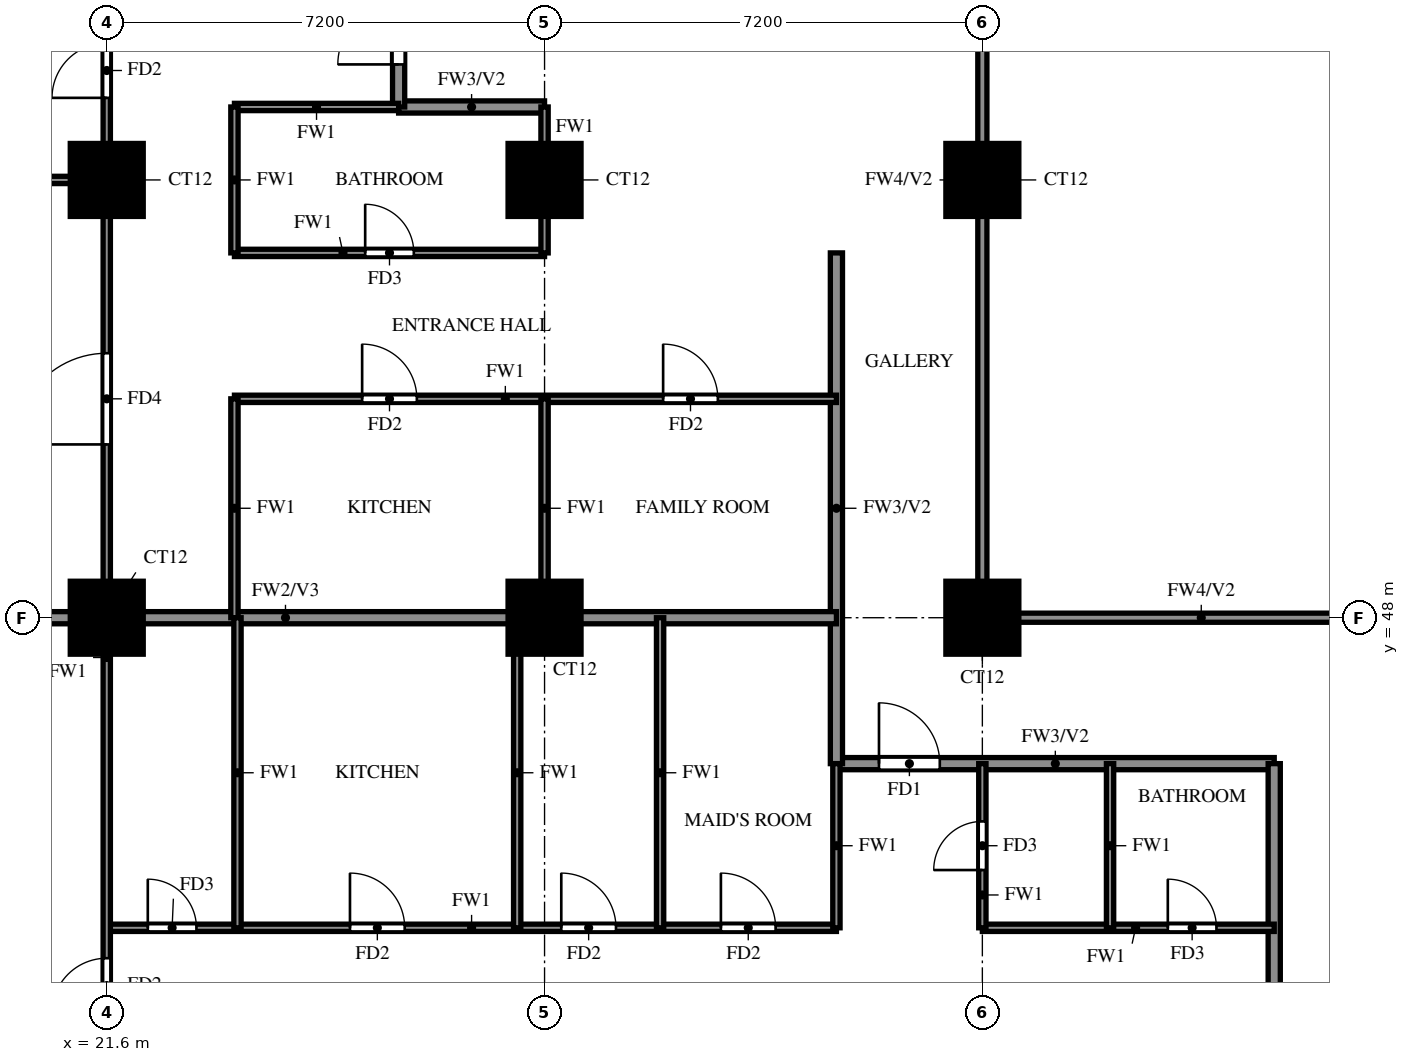
"""IFC4 building model, lengths in metres.
Left out: names, types, materials, properties, quantities, classifications, styles, units other than length and angle.
Written with IfcOpenShell. Run it as: python <this file> out.ifc"""

import sys

from ifc_helpers import new_model, si_unit, direction, frame, frame_2d, origin, origin_2d, place, context, subcontext, project, spatial, rectangle, extrude, source, transform, mapped, element, fill, save


model = new_model("IFC4")
c1 = context("Model", 3, precision=1e-05, world=origin(), true_north=direction((0.0, 1.0)))
c2 = subcontext(c1, "Body", "Model", "MODEL_VIEW")
j1 = project(units=[si_unit("LENGTHUNIT", "METRE"), si_unit("PLANEANGLEUNIT", "RADIAN")], contexts=[c1])
p1 = place(None, origin())
s1 = spatial("IfcSite", under=j1, at=p1, CompositionType="ELEMENT")
p2 = place(p1, origin())
s2 = spatial("IfcBuilding", under=s1, at=p2, CompositionType="ELEMENT")
p3 = place(p2, frame((0.0, 0.0, 93.5)))
s3 = spatial("IfcBuildingStorey", under=s2, at=p3, CompositionType="ELEMENT", Elevation=93.5)
m1 = source(origin(), c2, "Body", "SweptSolid", [
    extrude(rectangle(XDim=1.2, YDim=1.2, at=origin_2d()), origin(), (0.0, 0.0, 1.0), 3.18),
])
for number, where, z_axis, x_axis in (
    (1, (21.6, 48.0, 0.0), (0.0, 0.0, 1.0), (1.0, 0.0, 0.0)),
    (2, (28.8, 48.0, 0.0), (0.0, 0.0, 1.0), (1.0, 0.0, 0.0)),
    (3, (36.0, 48.0, 0.0), (0.0, 0.0, 1.0), (1.0, 0.0, 0.0)),
    (4, (21.6, 55.2, 0.0), (0.0, 0.0, 1.0), (1.0, 0.0, 0.0)),
    (5, (28.8, 55.2, 0.0), (0.0, 0.0, 1.0), (1.0, 0.0, 0.0)),
    (6, (36.0, 55.2, 0.0), (0.0, 0.0, 1.0), (1.0, 0.0, 0.0)),
):
    element("IfcColumn", number, at=place(p3, frame(where, z_axis=z_axis, x_axis=x_axis)), inside=s3, PredefinedType="COLUMN", context=c2, shape_type="MappedRepresentation", body=[
        mapped(m1, transform((0.0, 0.0, 0.0))),
    ])
p4 = place(p3, frame((33.6, 45.6, 0.0), z_axis=(0.0, 0.0, 1.0), x_axis=(1.0, 0.0, 0.0)))
e7 = element("IfcWall", 7, at=p4, inside=s3, PredefinedType="SOLIDWALL", context=c2, shape_type="SweptSolid", body=[
    extrude(rectangle(XDim=7.2, YDim=0.2, at=frame_2d((3.6, 0.0))), origin(), (0.0, 0.0, 1.0), 3.18),
])
p5 = place(p4, frame((0.7, 0.0, 0.0)))
e8 = element("IfcOpeningElement", 8, at=p5, cuts=e7, PredefinedType="OPENING", context=c2, shape_type="SweptSolid", body=[
    extrude(rectangle(XDim=1.0, YDim=2.1, at=frame_2d((0.5, 1.05))), frame((0.0, 0.11, 0.0), z_axis=(0.0, -1.0, 0.0), x_axis=(1.0, 0.0, 0.0)), (0.0, 0.0, 1.0), 0.22),
])
p6 = place(p3, frame((26.4, 56.4, 0.0), z_axis=(0.0, 0.0, 1.0), x_axis=(1.0, 0.0, 0.0)))
e9 = element("IfcWall", 9, at=p6, inside=s3, PredefinedType="SOLIDWALL", context=c2, shape_type="SweptSolid", body=[
    extrude(rectangle(XDim=2.4, YDim=0.2, at=frame_2d((1.2, 0.0))), origin(), (0.0, 0.0, 1.0), 3.18),
])
p7 = place(p3, frame((26.4, 56.4, 0.0), z_axis=(0.0, 0.0, 1.0), x_axis=(0.0, 1.0, 0.0)))
e10 = element("IfcWall", 10, at=p7, inside=s3, PredefinedType="SOLIDWALL", context=c2, shape_type="SweptSolid", body=[
    extrude(rectangle(XDim=9.6, YDim=0.2, at=frame_2d((4.8, 0.0))), origin(), (0.0, 0.0, 1.0), 3.18),
])
p8 = place(p7, frame((0.7, 0.0, 0.0)))
e11 = element("IfcOpeningElement", 11, at=p8, cuts=e10, PredefinedType="OPENING", context=c2, shape_type="SweptSolid", body=[
    extrude(rectangle(XDim=1.0, YDim=2.1, at=frame_2d((0.5, 1.05))), frame((0.0, 0.11, 0.0), z_axis=(0.0, -1.0, 0.0), x_axis=(1.0, 0.0, 0.0)), (0.0, 0.0, 1.0), 0.22),
])
p9 = place(p7, frame((3.1, 0.0, 0.0)))
e12 = element("IfcOpeningElement", 12, at=p9, cuts=e10, PredefinedType="OPENING", context=c2, shape_type="SweptSolid", body=[
    extrude(rectangle(XDim=1.0, YDim=2.1, at=frame_2d((0.5, 1.05))), frame((0.0, 0.11, 0.0), z_axis=(0.0, -1.0, 0.0), x_axis=(1.0, 0.0, 0.0)), (0.0, 0.0, 1.0), 0.22),
])
p10 = place(p3, frame((33.6, 45.6, 0.0), z_axis=(0.0, 0.0, 1.0), x_axis=(0.0, 1.0, 0.0)))
e13 = element("IfcWall", 13, at=p10, inside=s3, PredefinedType="SOLIDWALL", context=c2, shape_type="SweptSolid", body=[
    extrude(rectangle(XDim=8.4, YDim=0.2, at=frame_2d((4.2, 0.0))), origin(), (0.0, 0.0, 1.0), 3.18),
])
p11 = place(p3, frame((40.8, 33.725, 0.0), z_axis=(0.0, 0.0, 1.0), x_axis=(0.0, 1.0, 0.0)))
e14 = element("IfcWall", 14, at=p11, inside=s3, PredefinedType="SOLIDWALL", context=c2, shape_type="SweptSolid", body=[
    extrude(rectangle(XDim=11.875, YDim=0.2, at=frame_2d((5.938, 0.0))), origin(), (0.0, 0.0, 1.0), 2.28),
])
p12 = place(p3, frame((14.525, 48.0, 0.0), z_axis=(0.0, 0.0, 1.0), x_axis=(1.0, 0.0, 0.0)))
e15 = element("IfcWall", 15, at=p12, inside=s3, PredefinedType="SOLIDWALL", context=c2, shape_type="SweptSolid", body=[
    extrude(rectangle(XDim=19.075, YDim=0.2, at=frame_2d((9.538, 0.0))), origin(), (0.0, 0.0, 1.0), 3.18),
])
p13 = place(p3, frame((21.6, 42.9, 0.0), z_axis=(0.0, 0.0, 1.0), x_axis=(1.0, 0.0, 0.0)))
e16 = element("IfcWall", 16, at=p13, inside=s3, PredefinedType="PARTITIONING", context=c2, shape_type="SweptSolid", body=[
    extrude(rectangle(XDim=12.0, YDim=0.12, at=frame_2d((6.0, 0.0))), origin(), (0.0, 0.0, 1.0), 3.18),
])
p14 = place(p13, frame((0.675, 0.0, 0.0)))
e17 = element("IfcOpeningElement", 17, at=p14, cuts=e16, PredefinedType="OPENING", context=c2, shape_type="SweptSolid", body=[
    extrude(rectangle(XDim=0.8, YDim=2.1, at=frame_2d((0.4, 1.05))), frame((0.0, 0.07, 0.0), z_axis=(0.0, -1.0, 0.0), x_axis=(1.0, 0.0, 0.0)), (0.0, 0.0, 1.0), 0.14),
])
p15 = place(p13, frame((4.0, 0.0, 0.0)))
e18 = element("IfcOpeningElement", 18, at=p15, cuts=e16, PredefinedType="OPENING", context=c2, shape_type="SweptSolid", body=[
    extrude(rectangle(XDim=0.9, YDim=2.1, at=frame_2d((0.45, 1.05))), frame((0.0, 0.07, 0.0), z_axis=(0.0, -1.0, 0.0), x_axis=(1.0, 0.0, 0.0)), (0.0, 0.0, 1.0), 0.14),
])
p16 = place(p13, frame((7.475, 0.0, 0.0)))
e19 = element("IfcOpeningElement", 19, at=p16, cuts=e16, PredefinedType="OPENING", context=c2, shape_type="SweptSolid", body=[
    extrude(rectangle(XDim=0.9, YDim=2.1, at=frame_2d((0.45, 1.05))), frame((0.0, 0.07, 0.0), z_axis=(0.0, -1.0, 0.0), x_axis=(1.0, 0.0, 0.0)), (0.0, 0.0, 1.0), 0.14),
])
p17 = place(p13, frame((10.1, 0.0, 0.0)))
e20 = element("IfcOpeningElement", 20, at=p17, cuts=e16, PredefinedType="OPENING", context=c2, shape_type="SweptSolid", body=[
    extrude(rectangle(XDim=0.9, YDim=2.1, at=frame_2d((0.45, 1.05))), frame((0.0, 0.07, 0.0), z_axis=(0.0, -1.0, 0.0), x_axis=(1.0, 0.0, 0.0)), (0.0, 0.0, 1.0), 0.14),
])
p18 = place(p3, frame((36.0, 42.9, 0.0), z_axis=(0.0, 0.0, 1.0), x_axis=(1.0, 0.0, 0.0)))
e21 = element("IfcWall", 21, at=p18, inside=s3, PredefinedType="PARTITIONING", context=c2, shape_type="SweptSolid", body=[
    extrude(rectangle(XDim=4.8, YDim=0.12, at=frame_2d((2.4, 0.0))), origin(), (0.0, 0.0, 1.0), 3.18),
])
p19 = place(p18, frame((3.05, 0.0, 0.0)))
e22 = element("IfcOpeningElement", 22, at=p19, cuts=e21, PredefinedType="OPENING", context=c2, shape_type="SweptSolid", body=[
    extrude(rectangle(XDim=0.8, YDim=2.1, at=frame_2d((0.4, 1.05))), frame((0.0, 0.07, 0.0), z_axis=(0.0, -1.0, 0.0), x_axis=(1.0, 0.0, 0.0)), (0.0, 0.0, 1.0), 0.14),
])
p20 = place(p3, frame((23.7, 51.6, 0.0), z_axis=(0.0, 0.0, 1.0), x_axis=(1.0, 0.0, 0.0)))
e23 = element("IfcWall", 23, at=p20, inside=s3, PredefinedType="PARTITIONING", context=c2, shape_type="SweptSolid", body=[
    extrude(rectangle(XDim=9.9, YDim=0.12, at=frame_2d((4.95, 0.0))), origin(), (0.0, 0.0, 1.0), 3.18),
])
p21 = place(p20, frame((2.1, 0.0, 0.0)))
e24 = element("IfcOpeningElement", 24, at=p21, cuts=e23, PredefinedType="OPENING", context=c2, shape_type="SweptSolid", body=[
    extrude(rectangle(XDim=0.9, YDim=2.1, at=frame_2d((0.45, 1.05))), frame((0.0, 0.07, 0.0), z_axis=(0.0, -1.0, 0.0), x_axis=(1.0, 0.0, 0.0)), (0.0, 0.0, 1.0), 0.14),
])
p22 = place(p20, frame((7.05, 0.0, 0.0)))
e25 = element("IfcOpeningElement", 25, at=p22, cuts=e23, PredefinedType="OPENING", context=c2, shape_type="SweptSolid", body=[
    extrude(rectangle(XDim=0.9, YDim=2.1, at=frame_2d((0.45, 1.05))), frame((0.0, 0.07, 0.0), z_axis=(0.0, -1.0, 0.0), x_axis=(1.0, 0.0, 0.0)), (0.0, 0.0, 1.0), 0.14),
])
p23 = place(p3, frame((23.7, 54.0, 0.0), z_axis=(0.0, 0.0, 1.0), x_axis=(1.0, 0.0, 0.0)))
e26 = element("IfcWall", 26, at=p23, inside=s3, PredefinedType="PARTITIONING", context=c2, shape_type="SweptSolid", body=[
    extrude(rectangle(XDim=5.1, YDim=0.12, at=frame_2d((2.55, 0.0))), origin(), (0.0, 0.0, 1.0), 3.18),
])
p24 = place(p23, frame((2.15, 0.0, 0.0)))
e27 = element("IfcOpeningElement", 27, at=p24, cuts=e26, PredefinedType="OPENING", context=c2, shape_type="SweptSolid", body=[
    extrude(rectangle(XDim=0.8, YDim=2.1, at=frame_2d((0.4, 1.05))), frame((0.0, 0.07, 0.0), z_axis=(0.0, -1.0, 0.0), x_axis=(1.0, 0.0, 0.0)), (0.0, 0.0, 1.0), 0.14),
])
p25 = place(p3, frame((14.525, 55.2, 0.0), z_axis=(0.0, 0.0, 1.0), x_axis=(1.0, 0.0, 0.0)))
e28 = element("IfcWall", 28, at=p25, inside=s3, PredefinedType="PARTITIONING", context=c2, shape_type="SweptSolid", body=[
    extrude(rectangle(XDim=7.075, YDim=0.12, at=frame_2d((3.538, 0.0))), origin(), (0.0, 0.0, 1.0), 3.18),
])
p26 = place(p3, frame((23.7, 56.4, 0.0), z_axis=(0.0, 0.0, 1.0), x_axis=(1.0, 0.0, 0.0)))
e29 = element("IfcWall", 29, at=p26, inside=s3, PredefinedType="PARTITIONING", context=c2, shape_type="SweptSolid", body=[
    extrude(rectangle(XDim=2.7, YDim=0.12, at=frame_2d((1.35, 0.0))), origin(), (0.0, 0.0, 1.0), 3.18),
])
p27 = place(p3, frame((21.6, 33.725, 0.0), z_axis=(0.0, 0.0, 1.0), x_axis=(0.0, 1.0, 0.0)))
e30 = element("IfcWall", 30, at=p27, inside=s3, PredefinedType="PARTITIONING", context=c2, shape_type="SweptSolid", body=[
    extrude(rectangle(XDim=28.675, YDim=0.12, at=frame_2d((14.337, 0.0))), origin(), (0.0, 0.0, 1.0), 3.18),
])
p28 = place(p27, frame((7.775, 0.0, 0.0)))
e31 = element("IfcOpeningElement", 31, at=p28, cuts=e30, PredefinedType="OPENING", context=c2, shape_type="SweptSolid", body=[
    extrude(rectangle(XDim=0.9, YDim=2.1, at=frame_2d((0.45, 1.05))), frame((0.0, 0.07, 0.0), z_axis=(0.0, -1.0, 0.0), x_axis=(1.0, 0.0, 0.0)), (0.0, 0.0, 1.0), 0.14),
])
p29 = place(p27, frame((17.125, 0.0, 0.0)))
e32 = element("IfcOpeningElement", 32, at=p29, cuts=e30, PredefinedType="OPENING", context=c2, shape_type="SweptSolid", body=[
    extrude(rectangle(XDim=1.5, YDim=2.1, at=frame_2d((0.75, 1.05))), frame((0.0, 0.07, 0.0), z_axis=(0.0, -1.0, 0.0), x_axis=(1.0, 0.0, 0.0)), (0.0, 0.0, 1.0), 0.14),
])
p30 = place(p27, frame((22.825, 0.0, 0.0)))
e33 = element("IfcOpeningElement", 33, at=p30, cuts=e30, PredefinedType="OPENING", context=c2, shape_type="SweptSolid", body=[
    extrude(rectangle(XDim=0.9, YDim=2.1, at=frame_2d((0.45, 1.05))), frame((0.0, 0.07, 0.0), z_axis=(0.0, -1.0, 0.0), x_axis=(1.0, 0.0, 0.0)), (0.0, 0.0, 1.0), 0.14),
])
p31 = place(p27, frame((26.425, 0.0, 0.0)))
e34 = element("IfcOpeningElement", 34, at=p31, cuts=e30, PredefinedType="OPENING", context=c2, shape_type="SweptSolid", body=[
    extrude(rectangle(XDim=0.9, YDim=2.1, at=frame_2d((0.45, 1.05))), frame((0.0, 0.07, 0.0), z_axis=(0.0, -1.0, 0.0), x_axis=(1.0, 0.0, 0.0)), (0.0, 0.0, 1.0), 0.14),
])
p32 = place(p3, frame((23.7, 48.0, 0.0), z_axis=(0.0, 0.0, 1.0), x_axis=(0.0, 1.0, 0.0)))
e35 = element("IfcWall", 35, at=p32, inside=s3, PredefinedType="PARTITIONING", context=c2, shape_type="SweptSolid", body=[
    extrude(rectangle(XDim=3.6, YDim=0.12, at=frame_2d((1.8, 0.0))), origin(), (0.0, 0.0, 1.0), 3.18),
])
p33 = place(p3, frame((23.7, 54.0, 0.0), z_axis=(0.0, 0.0, 1.0), x_axis=(0.0, 1.0, 0.0)))
e36 = element("IfcWall", 36, at=p33, inside=s3, PredefinedType="PARTITIONING", context=c2, shape_type="SweptSolid", body=[
    extrude(rectangle(XDim=2.4, YDim=0.12, at=frame_2d((1.2, 0.0))), origin(), (0.0, 0.0, 1.0), 3.18),
])
for number, where, z_axis, x_axis in (
    (37, (23.75, 42.9, 0.0), (0.0, 0.0, 1.0), (0.0, 1.0, 0.0)),
    (38, (28.35, 42.9, 0.0), (0.0, 0.0, 1.0), (0.0, 1.0, 0.0)),
):
    element("IfcWall", number, at=place(p3, frame(where, z_axis=z_axis, x_axis=x_axis)), inside=s3, PredefinedType="PARTITIONING", context=c2, shape_type="SweptSolid", body=[
        extrude(rectangle(XDim=5.1, YDim=0.12, at=frame_2d((2.55, 0.0))), origin(), (0.0, 0.0, 1.0), 3.18),
    ])
p34 = place(p3, frame((28.8, 48.0, 0.0), z_axis=(0.0, 0.0, 1.0), x_axis=(0.0, 1.0, 0.0)))
e39 = element("IfcWall", 39, at=p34, inside=s3, PredefinedType="PARTITIONING", context=c2, shape_type="SweptSolid", body=[
    extrude(rectangle(XDim=3.6, YDim=0.12, at=frame_2d((1.8, 0.0))), origin(), (0.0, 0.0, 1.0), 3.18),
])
p35 = place(p3, frame((28.8, 54.0, 0.0), z_axis=(0.0, 0.0, 1.0), x_axis=(0.0, 1.0, 0.0)))
e40 = element("IfcWall", 40, at=p35, inside=s3, PredefinedType="PARTITIONING", context=c2, shape_type="SweptSolid", body=[
    extrude(rectangle(XDim=2.4, YDim=0.12, at=frame_2d((1.2, 0.0))), origin(), (0.0, 0.0, 1.0), 3.18),
])
p36 = place(p3, frame((30.7, 42.9, 0.0), z_axis=(0.0, 0.0, 1.0), x_axis=(0.0, 1.0, 0.0)))
e41 = element("IfcWall", 41, at=p36, inside=s3, PredefinedType="PARTITIONING", context=c2, shape_type="SweptSolid", body=[
    extrude(rectangle(XDim=5.1, YDim=0.12, at=frame_2d((2.55, 0.0))), origin(), (0.0, 0.0, 1.0), 3.18),
])
p37 = place(p3, frame((33.6, 42.9, 0.0), z_axis=(0.0, 0.0, 1.0), x_axis=(0.0, 1.0, 0.0)))
e42 = element("IfcWall", 42, at=p37, inside=s3, PredefinedType="PARTITIONING", context=c2, shape_type="SweptSolid", body=[
    extrude(rectangle(XDim=2.7, YDim=0.12, at=frame_2d((1.35, 0.0))), origin(), (0.0, 0.0, 1.0), 3.18),
])
p38 = place(p3, frame((36.0, 42.9, 0.0), z_axis=(0.0, 0.0, 1.0), x_axis=(0.0, 1.0, 0.0)))
e43 = element("IfcWall", 43, at=p38, inside=s3, PredefinedType="PARTITIONING", context=c2, shape_type="SweptSolid", body=[
    extrude(rectangle(XDim=2.7, YDim=0.12, at=frame_2d((1.35, 0.0))), origin(), (0.0, 0.0, 1.0), 3.18),
])
p39 = place(p38, frame((0.95, 0.0, 0.0)))
e44 = element("IfcOpeningElement", 44, at=p39, cuts=e43, PredefinedType="OPENING", context=c2, shape_type="SweptSolid", body=[
    extrude(rectangle(XDim=0.8, YDim=2.1, at=frame_2d((0.4, 1.05))), frame((0.0, 0.07, 0.0), z_axis=(0.0, -1.0, 0.0), x_axis=(1.0, 0.0, 0.0)), (0.0, 0.0, 1.0), 0.14),
])
p40 = place(p3, frame((38.1, 42.9, 0.0), z_axis=(0.0, 0.0, 1.0), x_axis=(0.0, 1.0, 0.0)))
e45 = element("IfcWall", 45, at=p40, inside=s3, PredefinedType="PARTITIONING", context=c2, shape_type="SweptSolid", body=[
    extrude(rectangle(XDim=2.7, YDim=0.12, at=frame_2d((1.35, 0.0))), origin(), (0.0, 0.0, 1.0), 3.18),
])
p41 = place(p3, frame((36.0, 48.0, 0.0), z_axis=(0.0, 0.0, 1.0), x_axis=(1.0, 0.0, 0.0)))
e46 = element("IfcWall", 46, at=p41, inside=s3, PredefinedType="SOLIDWALL", context=c2, shape_type="SweptSolid", body=[
    extrude(rectangle(XDim=7.2, YDim=0.15, at=frame_2d((3.6, 0.0))), origin(), (0.0, 0.0, 1.0), 2.28),
])
p42 = place(p3, frame((36.0, 48.0, 0.0), z_axis=(0.0, 0.0, 1.0), x_axis=(0.0, 1.0, 0.0)))
e47 = element("IfcWall", 47, at=p42, inside=s3, PredefinedType="SOLIDWALL", context=c2, shape_type="SweptSolid", body=[
    extrude(rectangle(XDim=14.4, YDim=0.15, at=frame_2d((7.2, 0.0))), origin(), (0.0, 0.0, 1.0), 2.28),
])
p43 = place(p5, origin())
e48 = element("IfcDoor", 48, at=p43, inside=s3, OperationType="SINGLE_SWING_RIGHT", PredefinedType="DOOR", context=c2, shape_type="SweptSolid", body=[
    extrude(rectangle(XDim=1.0, YDim=2.1, at=frame_2d((0.5, 1.05))), frame((0.0, 0.025, 0.0), z_axis=(0.0, -1.0, 0.0), x_axis=(1.0, 0.0, 0.0)), (0.0, 0.0, 1.0), 0.05),
])
fill(e8, e48)
p44 = place(p28, origin())
e49 = element("IfcDoor", 49, at=p44, inside=s3, OperationType="SINGLE_SWING_RIGHT", PredefinedType="DOOR", context=c2, shape_type="SweptSolid", body=[
    extrude(rectangle(XDim=0.9, YDim=2.1, at=frame_2d((0.45, 1.05))), frame((0.0, 0.025, 0.0), z_axis=(0.0, -1.0, 0.0), x_axis=(1.0, 0.0, 0.0)), (0.0, 0.0, 1.0), 0.05),
])
fill(e31, e49)
p45 = place(p14, origin())
e50 = element("IfcDoor", 50, at=p45, inside=s3, OperationType="SINGLE_SWING_LEFT", PredefinedType="DOOR", context=c2, shape_type="SweptSolid", body=[
    extrude(rectangle(XDim=0.8, YDim=2.1, at=frame_2d((0.4, 1.05))), frame((0.0, 0.025, 0.0), z_axis=(0.0, -1.0, 0.0), x_axis=(1.0, 0.0, 0.0)), (0.0, 0.0, 1.0), 0.05),
])
fill(e17, e50)
p46 = place(p15, origin())
e51 = element("IfcDoor", 51, at=p46, inside=s3, OperationType="SINGLE_SWING_LEFT", PredefinedType="DOOR", context=c2, shape_type="SweptSolid", body=[
    extrude(rectangle(XDim=0.9, YDim=2.1, at=frame_2d((0.45, 1.05))), frame((0.0, 0.025, 0.0), z_axis=(0.0, -1.0, 0.0), x_axis=(1.0, 0.0, 0.0)), (0.0, 0.0, 1.0), 0.05),
])
fill(e18, e51)
p47 = place(p16, origin())
e52 = element("IfcDoor", 52, at=p47, inside=s3, OperationType="SINGLE_SWING_RIGHT", PredefinedType="DOOR", context=c2, shape_type="SweptSolid", body=[
    extrude(rectangle(XDim=0.9, YDim=2.1, at=frame_2d((0.45, 1.05))), frame((0.0, 0.025, 0.0), z_axis=(0.0, -1.0, 0.0), x_axis=(1.0, 0.0, 0.0)), (0.0, 0.0, 1.0), 0.05),
])
fill(e19, e52)
p48 = place(p17, origin())
e53 = element("IfcDoor", 53, at=p48, inside=s3, OperationType="SINGLE_SWING_LEFT", PredefinedType="DOOR", context=c2, shape_type="SweptSolid", body=[
    extrude(rectangle(XDim=0.9, YDim=2.1, at=frame_2d((0.45, 1.05))), frame((0.0, 0.025, 0.0), z_axis=(0.0, -1.0, 0.0), x_axis=(1.0, 0.0, 0.0)), (0.0, 0.0, 1.0), 0.05),
])
fill(e20, e53)
p49 = place(p39, origin())
e54 = element("IfcDoor", 54, at=p49, inside=s3, OperationType="SINGLE_SWING_LEFT", PredefinedType="DOOR", context=c2, shape_type="SweptSolid", body=[
    extrude(rectangle(XDim=0.8, YDim=2.1, at=frame_2d((0.4, 1.05))), frame((0.0, 0.025, 0.0), z_axis=(0.0, -1.0, 0.0), x_axis=(1.0, 0.0, 0.0)), (0.0, 0.0, 1.0), 0.05),
])
fill(e44, e54)
p50 = place(p19, origin())
e55 = element("IfcDoor", 55, at=p50, inside=s3, OperationType="SINGLE_SWING_RIGHT", PredefinedType="DOOR", context=c2, shape_type="SweptSolid", body=[
    extrude(rectangle(XDim=0.8, YDim=2.1, at=frame_2d((0.4, 1.05))), frame((0.0, 0.025, 0.0), z_axis=(0.0, -1.0, 0.0), x_axis=(1.0, 0.0, 0.0)), (0.0, 0.0, 1.0), 0.05),
])
fill(e22, e55)
p51 = place(p8, origin())
e56 = element("IfcDoor", 56, at=p51, inside=s3, OperationType="SINGLE_SWING_LEFT", PredefinedType="DOOR", context=c2, shape_type="SweptSolid", body=[
    extrude(rectangle(XDim=1.0, YDim=2.1, at=frame_2d((0.5, 1.05))), frame((0.0, 0.025, 0.0), z_axis=(0.0, -1.0, 0.0), x_axis=(1.0, 0.0, 0.0)), (0.0, 0.0, 1.0), 0.05),
])
fill(e11, e56)
p52 = place(p29, origin())
e57 = element("IfcDoor", 57, at=p52, inside=s3, OperationType="SINGLE_SWING_LEFT", PredefinedType="DOOR", context=c2, shape_type="SweptSolid", body=[
    extrude(rectangle(XDim=1.5, YDim=2.1, at=frame_2d((0.75, 1.05))), frame((0.0, 0.025, 0.0), z_axis=(0.0, -1.0, 0.0), x_axis=(1.0, 0.0, 0.0)), (0.0, 0.0, 1.0), 0.05),
])
fill(e32, e57)
p53 = place(p30, origin())
e58 = element("IfcDoor", 58, at=p53, inside=s3, OperationType="SINGLE_SWING_RIGHT", PredefinedType="DOOR", context=c2, shape_type="SweptSolid", body=[
    extrude(rectangle(XDim=0.9, YDim=2.1, at=frame_2d((0.45, 1.05))), frame((0.0, 0.025, 0.0), z_axis=(0.0, -1.0, 0.0), x_axis=(1.0, 0.0, 0.0)), (0.0, 0.0, 1.0), 0.05),
])
fill(e33, e58)
p54 = place(p21, origin())
e59 = element("IfcDoor", 59, at=p54, inside=s3, OperationType="SINGLE_SWING_LEFT", PredefinedType="DOOR", context=c2, shape_type="SweptSolid", body=[
    extrude(rectangle(XDim=0.9, YDim=2.1, at=frame_2d((0.45, 1.05))), frame((0.0, 0.025, 0.0), z_axis=(0.0, -1.0, 0.0), x_axis=(1.0, 0.0, 0.0)), (0.0, 0.0, 1.0), 0.05),
])
fill(e24, e59)
p55 = place(p24, origin())
e60 = element("IfcDoor", 60, at=p55, inside=s3, OperationType="SINGLE_SWING_LEFT", PredefinedType="DOOR", context=c2, shape_type="SweptSolid", body=[
    extrude(rectangle(XDim=0.8, YDim=2.1, at=frame_2d((0.4, 1.05))), frame((0.0, 0.025, 0.0), z_axis=(0.0, -1.0, 0.0), x_axis=(1.0, 0.0, 0.0)), (0.0, 0.0, 1.0), 0.05),
])
fill(e27, e60)
p56 = place(p22, origin())
e61 = element("IfcDoor", 61, at=p56, inside=s3, OperationType="SINGLE_SWING_RIGHT", PredefinedType="DOOR", context=c2, shape_type="SweptSolid", body=[
    extrude(rectangle(XDim=0.9, YDim=2.1, at=frame_2d((0.45, 1.05))), frame((0.0, 0.025, 0.0), z_axis=(0.0, -1.0, 0.0), x_axis=(1.0, 0.0, 0.0)), (0.0, 0.0, 1.0), 0.05),
])
fill(e25, e61)
save(model, sys.argv[1])
